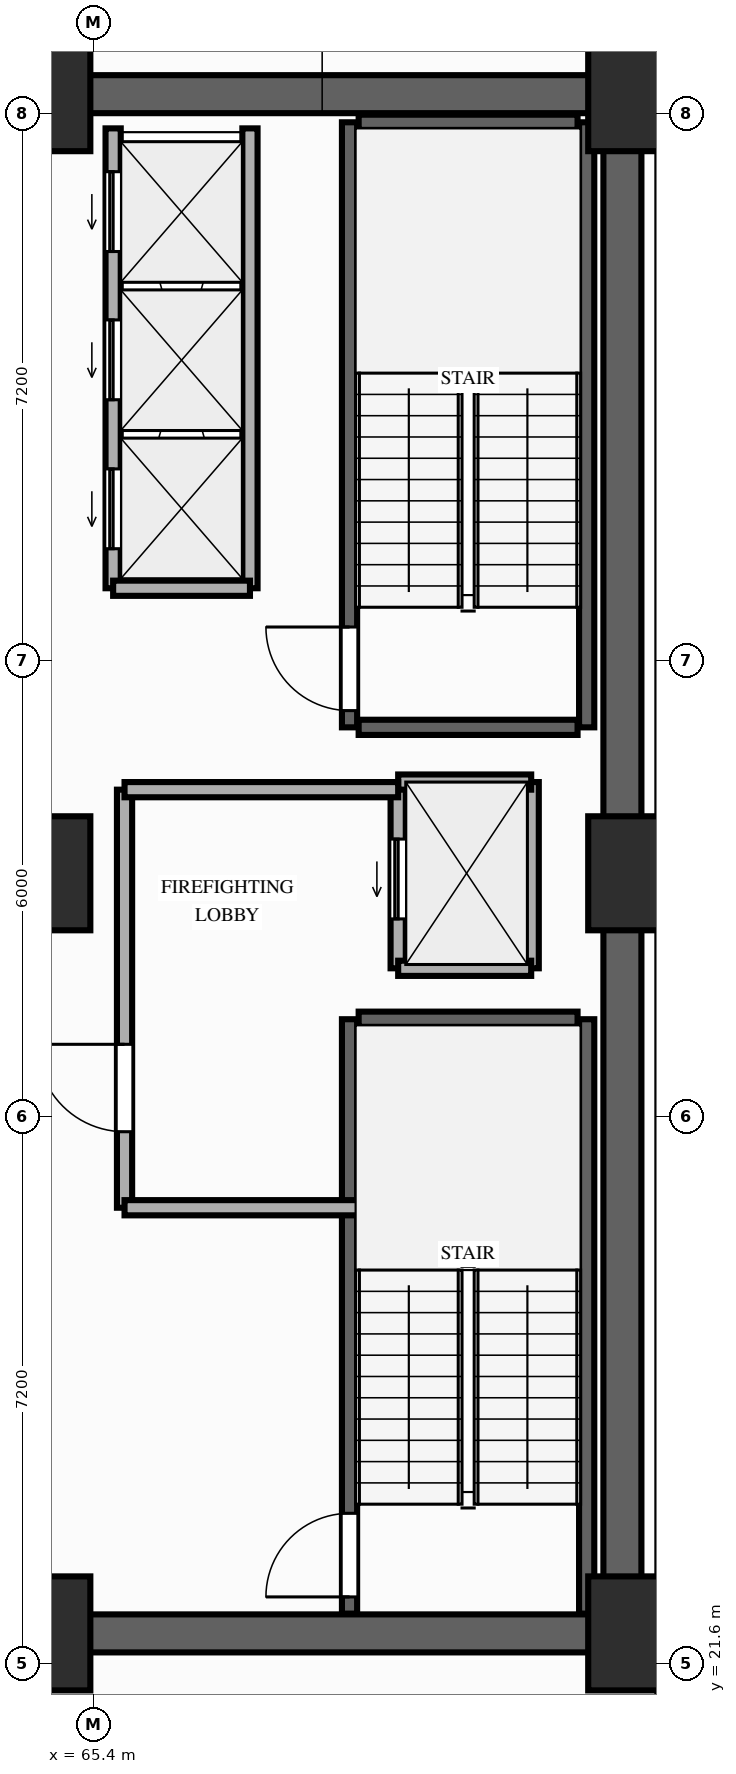
"""IFC4 building model, lengths in metres.
Left out: names, types, materials, properties, quantities, classifications, styles, units other than length and angle.
Written with IfcOpenShell. Run it as: python <this file> out.ifc"""

import sys

from ifc_helpers import new_model, si_unit, direction, frame, frame_2d, origin, origin_2d, place, context, subcontext, project, spatial, rectangle, extrude, element, fill, save


model = new_model("IFC4")
c1 = context("Model", 3, precision=1e-05, world=origin(), true_north=direction((0.0, 1.0)))
c2 = subcontext(c1, "Body", "Model", "MODEL_VIEW")
j1 = project(units=[si_unit("LENGTHUNIT", "METRE"), si_unit("PLANEANGLEUNIT", "RADIAN")], contexts=[c1])
p1 = place(None, origin())
s1 = spatial("IfcSite", under=j1, at=p1, CompositionType="ELEMENT")
p2 = place(p1, origin())
s2 = spatial("IfcBuilding", under=s1, at=p2, CompositionType="ELEMENT")
p3 = place(p2, frame((0.0, 0.0, 4.6)))
s3 = spatial("IfcBuildingStorey", under=s2, at=p3, CompositionType="ELEMENT", Elevation=4.6)
for number, where, z_axis, x_axis in (
    (1, (64.6, 22.0, 0.0), (0.0, 0.0, 1.0), (1.0, 0.0, 0.0)),
    (2, (72.65, 22.0, 0.0), (0.0, 0.0, 1.0), (1.0, 0.0, 0.0)),
    (3, (64.6, 32.0, 0.0), (0.0, 0.0, 1.0), (1.0, 0.0, 0.0)),
    (4, (72.65, 32.0, 0.0), (0.0, 0.0, 1.0), (1.0, 0.0, 0.0)),
    (5, (64.6, 42.25, 0.0), (0.0, 0.0, 1.0), (1.0, 0.0, 0.0)),
    (6, (72.65, 42.25, 0.0), (0.0, 0.0, 1.0), (1.0, 0.0, 0.0)),
):
    element("IfcColumn", number, at=place(p3, frame(where, z_axis=z_axis, x_axis=x_axis)), inside=s3, PredefinedType="COLUMN", context=c2, shape_type="SweptSolid", body=[
        extrude(rectangle(XDim=1.5, YDim=1.5, at=origin_2d()), origin(), (0.0, 0.0, 1.0), 4.2),
    ])
p4 = place(p3, frame((72.35, 22.0, 0.0), z_axis=(0.0, 0.0, 1.0), x_axis=(0.0, 1.0, 0.0)))
e7 = element("IfcWall", 7, at=p4, inside=s3, PredefinedType="SHEAR", context=c2, shape_type="SweptSolid", body=[
    extrude(rectangle(XDim=20.25, YDim=0.5, at=frame_2d((10.125, 0.0))), origin(), (0.0, 0.0, 1.0), 3.95),
])
for number, where, z_axis, x_axis in (
    (8, (64.6, 42.25, 0.0), (0.0, 0.0, 1.0), (1.0, 0.0, 0.0)),
    (9, (64.6, 22.0, 0.0), (0.0, 0.0, 1.0), (1.0, 0.0, 0.0)),
):
    element("IfcWall", number, at=place(p3, frame(where, z_axis=z_axis, x_axis=x_axis)), inside=s3, PredefinedType="SHEAR", context=c2, shape_type="SweptSolid", body=[
        extrude(rectangle(XDim=7.5, YDim=0.5, at=frame_2d((3.75, 0.0))), origin(), (0.0, 0.0, 1.0), 3.95),
    ])
p5 = place(p3, frame((68.76, 22.26, 0.0), z_axis=(0.0, 0.0, 1.0), x_axis=(0.0, 1.0, 0.0)))
e10 = element("IfcWall", 10, at=p5, inside=s3, PredefinedType="SHEAR", context=c2, shape_type="SweptSolid", body=[
    extrude(rectangle(XDim=7.82, YDim=0.2, at=frame_2d((3.91, 0.0))), origin(), (0.0, 0.0, 1.0), 3.95),
])
p6 = place(p5, frame((0.22, 0.0, 0.0)))
e11 = element("IfcOpeningElement", 11, at=p6, cuts=e10, PredefinedType="OPENING", context=c2, shape_type="SweptSolid", body=[
    extrude(rectangle(XDim=1.1, YDim=2.15, at=frame_2d((0.55, 1.075))), frame((0.0, 0.11, 0.0), z_axis=(0.0, -1.0, 0.0), x_axis=(1.0, 0.0, 0.0)), (0.0, 0.0, 1.0), 0.22),
])
p7 = place(p3, frame((71.88, 22.26, 0.0), z_axis=(0.0, 0.0, 1.0), x_axis=(0.0, 1.0, 0.0)))
e12 = element("IfcWall", 12, at=p7, inside=s3, PredefinedType="SHEAR", context=c2, shape_type="SweptSolid", body=[
    extrude(rectangle(XDim=7.82, YDim=0.2, at=frame_2d((3.91, 0.0))), origin(), (0.0, 0.0, 1.0), 3.95),
])
p8 = place(p3, frame((68.88, 30.08, 0.0), z_axis=(0.0, 0.0, 1.0), x_axis=(1.0, 0.0, 0.0)))
e13 = element("IfcWall", 13, at=p8, inside=s3, PredefinedType="SHEAR", context=c2, shape_type="SweptSolid", body=[
    extrude(rectangle(XDim=2.88, YDim=0.2, at=frame_2d((1.44, 0.0))), origin(), (0.0, 0.0, 1.0), 3.95),
])
p9 = place(p3, frame((68.76, 33.92, 0.0), z_axis=(0.0, 0.0, 1.0), x_axis=(0.0, 1.0, 0.0)))
e14 = element("IfcWall", 14, at=p9, inside=s3, PredefinedType="SHEAR", context=c2, shape_type="SweptSolid", body=[
    extrude(rectangle(XDim=7.96, YDim=0.2, at=frame_2d((3.98, 0.0))), origin(), (0.0, 0.0, 1.0), 3.95),
])
p10 = place(p9, frame((0.22, 0.0, 0.0)))
e15 = element("IfcOpeningElement", 15, at=p10, cuts=e14, PredefinedType="OPENING", context=c2, shape_type="SweptSolid", body=[
    extrude(rectangle(XDim=1.1, YDim=2.15, at=frame_2d((0.55, 1.075))), frame((0.0, 0.11, 0.0), z_axis=(0.0, -1.0, 0.0), x_axis=(1.0, 0.0, 0.0)), (0.0, 0.0, 1.0), 0.22),
])
p11 = place(p3, frame((71.88, 33.92, 0.0), z_axis=(0.0, 0.0, 1.0), x_axis=(0.0, 1.0, 0.0)))
e16 = element("IfcWall", 16, at=p11, inside=s3, PredefinedType="SHEAR", context=c2, shape_type="SweptSolid", body=[
    extrude(rectangle(XDim=7.96, YDim=0.2, at=frame_2d((3.98, 0.0))), origin(), (0.0, 0.0, 1.0), 3.95),
])
for number, where, z_axis, x_axis in (
    (17, (68.88, 41.88, 0.0), (0.0, 0.0, 1.0), (1.0, 0.0, 0.0)),
    (18, (68.88, 33.92, 0.0), (0.0, 0.0, 1.0), (1.0, 0.0, 0.0)),
):
    element("IfcWall", number, at=place(p3, frame(where, z_axis=z_axis, x_axis=x_axis)), inside=s3, PredefinedType="SHEAR", context=c2, shape_type="SweptSolid", body=[
        extrude(rectangle(XDim=2.88, YDim=0.2, at=frame_2d((1.44, 0.0))), origin(), (0.0, 0.0, 1.0), 3.95),
    ])
p12 = place(p3, frame((65.65, 35.75, 0.0), z_axis=(0.0, 0.0, 1.0), x_axis=(0.0, 1.0, 0.0)))
e19 = element("IfcWall", 19, at=p12, inside=s3, PredefinedType="MOVABLE", context=c2, shape_type="SweptSolid", body=[
    extrude(rectangle(XDim=6.05, YDim=0.2, at=frame_2d((3.025, 0.0))), origin(), (0.0, 0.0, 1.0), 3.95),
])
p13 = place(p12, frame((0.52, 0.0, 0.0)))
e20 = element("IfcOpeningElement", 20, at=p13, cuts=e19, PredefinedType="OPENING", context=c2, shape_type="SweptSolid", body=[
    extrude(rectangle(XDim=1.05, YDim=2.15, at=frame_2d((0.525, 1.075))), frame((0.0, 0.11, 0.0), z_axis=(0.0, -1.0, 0.0), x_axis=(1.0, 0.0, 0.0)), (0.0, 0.0, 1.0), 0.22),
])
p14 = place(p12, frame((2.48, 0.0, 0.0)))
e21 = element("IfcOpeningElement", 21, at=p14, cuts=e19, PredefinedType="OPENING", context=c2, shape_type="SweptSolid", body=[
    extrude(rectangle(XDim=1.05, YDim=2.15, at=frame_2d((0.525, 1.075))), frame((0.0, 0.11, 0.0), z_axis=(0.0, -1.0, 0.0), x_axis=(1.0, 0.0, 0.0)), (0.0, 0.0, 1.0), 0.22),
])
p15 = place(p12, frame((4.43, 0.0, 0.0)))
e22 = element("IfcOpeningElement", 22, at=p15, cuts=e19, PredefinedType="OPENING", context=c2, shape_type="SweptSolid", body=[
    extrude(rectangle(XDim=1.05, YDim=2.15, at=frame_2d((0.525, 1.075))), frame((0.0, 0.11, 0.0), z_axis=(0.0, -1.0, 0.0), x_axis=(1.0, 0.0, 0.0)), (0.0, 0.0, 1.0), 0.22),
])
p16 = place(p3, frame((67.45, 35.75, 0.0), z_axis=(0.0, 0.0, 1.0), x_axis=(0.0, 1.0, 0.0)))
e23 = element("IfcWall", 23, at=p16, inside=s3, PredefinedType="MOVABLE", context=c2, shape_type="SweptSolid", body=[
    extrude(rectangle(XDim=6.05, YDim=0.2, at=frame_2d((3.025, 0.0))), origin(), (0.0, 0.0, 1.0), 3.95),
])
p17 = place(p3, frame((65.65, 35.75, 0.0), z_axis=(0.0, 0.0, 1.0), x_axis=(1.0, 0.0, 0.0)))
e24 = element("IfcWall", 24, at=p17, inside=s3, PredefinedType="MOVABLE", context=c2, shape_type="SweptSolid", body=[
    extrude(rectangle(XDim=1.8, YDim=0.2, at=frame_2d((0.9, 0.0))), origin(), (0.0, 0.0, 1.0), 3.95),
])
p18 = place(p3, frame((69.4, 30.75, 0.0), z_axis=(0.0, 0.0, 1.0), x_axis=(0.0, 1.0, 0.0)))
e25 = element("IfcWall", 25, at=p18, inside=s3, PredefinedType="MOVABLE", context=c2, shape_type="SweptSolid", body=[
    extrude(rectangle(XDim=2.45, YDim=0.2, at=frame_2d((1.225, 0.0))), origin(), (0.0, 0.0, 1.0), 3.95),
])
p19 = place(p18, frame((0.65, 0.0, 0.0)))
e26 = element("IfcOpeningElement", 26, at=p19, cuts=e25, PredefinedType="OPENING", context=c2, shape_type="SweptSolid", body=[
    extrude(rectangle(XDim=1.05, YDim=2.15, at=frame_2d((0.525, 1.075))), frame((0.0, 0.11, 0.0), z_axis=(0.0, -1.0, 0.0), x_axis=(1.0, 0.0, 0.0)), (0.0, 0.0, 1.0), 0.22),
])
p20 = place(p3, frame((71.15, 30.75, 0.0), z_axis=(0.0, 0.0, 1.0), x_axis=(0.0, 1.0, 0.0)))
e27 = element("IfcWall", 27, at=p20, inside=s3, PredefinedType="MOVABLE", context=c2, shape_type="SweptSolid", body=[
    extrude(rectangle(XDim=2.45, YDim=0.2, at=frame_2d((1.225, 0.0))), origin(), (0.0, 0.0, 1.0), 3.95),
])
for number, where, z_axis, x_axis in (
    (28, (69.4, 33.2, 0.0), (0.0, 0.0, 1.0), (1.0, 0.0, 0.0)),
    (29, (69.4, 30.75, 0.0), (0.0, 0.0, 1.0), (1.0, 0.0, 0.0)),
):
    element("IfcWall", number, at=place(p3, frame(where, z_axis=z_axis, x_axis=x_axis)), inside=s3, PredefinedType="MOVABLE", context=c2, shape_type="SweptSolid", body=[
        extrude(rectangle(XDim=1.75, YDim=0.2, at=frame_2d((0.875, 0.0))), origin(), (0.0, 0.0, 1.0), 3.95),
    ])
p21 = place(p3, frame((65.8, 27.6, 0.0), z_axis=(0.0, 0.0, 1.0), x_axis=(0.0, 1.0, 0.0)))
e30 = element("IfcWall", 30, at=p21, inside=s3, PredefinedType="PARTITIONING", context=c2, shape_type="SweptSolid", body=[
    extrude(rectangle(XDim=5.5, YDim=0.2, at=frame_2d((2.75, 0.0))), origin(), (0.0, 0.0, 1.0), 3.95),
])
p22 = place(p21, frame((1.0, 0.0, 0.0)))
e31 = element("IfcOpeningElement", 31, at=p22, cuts=e30, PredefinedType="OPENING", context=c2, shape_type="SweptSolid", body=[
    extrude(rectangle(XDim=1.15, YDim=2.15, at=frame_2d((0.575, 1.075))), frame((0.0, 0.11, 0.0), z_axis=(0.0, -1.0, 0.0), x_axis=(1.0, 0.0, 0.0)), (0.0, 0.0, 1.0), 0.22),
])
p23 = place(p3, frame((65.8, 33.1, 0.0), z_axis=(0.0, 0.0, 1.0), x_axis=(1.0, 0.0, 0.0)))
e32 = element("IfcWall", 32, at=p23, inside=s3, PredefinedType="PARTITIONING", context=c2, shape_type="SweptSolid", body=[
    extrude(rectangle(XDim=3.6, YDim=0.2, at=frame_2d((1.8, 0.0))), origin(), (0.0, 0.0, 1.0), 3.95),
])
p24 = place(p3, frame((65.8, 27.6, 0.0), z_axis=(0.0, 0.0, 1.0), x_axis=(1.0, 0.0, 0.0)))
e33 = element("IfcWall", 33, at=p24, inside=s3, PredefinedType="PARTITIONING", context=c2, shape_type="SweptSolid", body=[
    extrude(rectangle(XDim=3.4, YDim=0.2, at=frame_2d((1.7, 0.0))), origin(), (0.0, 0.0, 1.0), 3.95),
])
p25 = place(p6, origin())
e34 = element("IfcDoor", 34, at=p25, inside=s3, OperationType="SINGLE_SWING_LEFT", PredefinedType="DOOR", context=c2, shape_type="SweptSolid", body=[
    extrude(rectangle(XDim=1.1, YDim=2.15, at=frame_2d((0.55, 1.075))), frame((0.0, 0.025, 0.0), z_axis=(0.0, -1.0, 0.0), x_axis=(1.0, 0.0, 0.0)), (0.0, 0.0, 1.0), 0.05),
])
fill(e11, e34)
p26 = place(p10, origin())
e35 = element("IfcDoor", 35, at=p26, inside=s3, OperationType="SINGLE_SWING_RIGHT", PredefinedType="DOOR", context=c2, shape_type="SweptSolid", body=[
    extrude(rectangle(XDim=1.1, YDim=2.15, at=frame_2d((0.55, 1.075))), frame((0.0, 0.025, 0.0), z_axis=(0.0, -1.0, 0.0), x_axis=(1.0, 0.0, 0.0)), (0.0, 0.0, 1.0), 0.05),
])
fill(e15, e35)
p27 = place(p13, origin())
e36 = element("IfcDoor", 36, at=p27, inside=s3, OperationType="SLIDING_TO_LEFT", PredefinedType="DOOR", context=c2, shape_type="SweptSolid", body=[
    extrude(rectangle(XDim=1.05, YDim=2.15, at=frame_2d((0.525, 1.075))), frame((0.0, 0.025, 0.0), z_axis=(0.0, -1.0, 0.0), x_axis=(1.0, 0.0, 0.0)), (0.0, 0.0, 1.0), 0.05),
])
fill(e20, e36)
p28 = place(p14, origin())
e37 = element("IfcDoor", 37, at=p28, inside=s3, OperationType="SLIDING_TO_LEFT", PredefinedType="DOOR", context=c2, shape_type="SweptSolid", body=[
    extrude(rectangle(XDim=1.05, YDim=2.15, at=frame_2d((0.525, 1.075))), frame((0.0, 0.025, 0.0), z_axis=(0.0, -1.0, 0.0), x_axis=(1.0, 0.0, 0.0)), (0.0, 0.0, 1.0), 0.05),
])
fill(e21, e37)
p29 = place(p15, origin())
e38 = element("IfcDoor", 38, at=p29, inside=s3, OperationType="SLIDING_TO_LEFT", PredefinedType="DOOR", context=c2, shape_type="SweptSolid", body=[
    extrude(rectangle(XDim=1.05, YDim=2.15, at=frame_2d((0.525, 1.075))), frame((0.0, 0.025, 0.0), z_axis=(0.0, -1.0, 0.0), x_axis=(1.0, 0.0, 0.0)), (0.0, 0.0, 1.0), 0.05),
])
fill(e22, e38)
p30 = place(p19, origin())
e39 = element("IfcDoor", 39, at=p30, inside=s3, OperationType="SLIDING_TO_LEFT", PredefinedType="DOOR", context=c2, shape_type="SweptSolid", body=[
    extrude(rectangle(XDim=1.05, YDim=2.15, at=frame_2d((0.525, 1.075))), frame((0.0, 0.025, 0.0), z_axis=(0.0, -1.0, 0.0), x_axis=(1.0, 0.0, 0.0)), (0.0, 0.0, 1.0), 0.05),
])
fill(e26, e39)
p31 = place(p22, origin())
e40 = element("IfcDoor", 40, at=p31, inside=s3, OperationType="SINGLE_SWING_RIGHT", PredefinedType="DOOR", context=c2, shape_type="SweptSolid", body=[
    extrude(rectangle(XDim=1.15, YDim=2.15, at=frame_2d((0.575, 1.075))), frame((0.0, 0.025, 0.0), z_axis=(0.0, -1.0, 0.0), x_axis=(1.0, 0.0, 0.0)), (0.0, 0.0, 1.0), 0.05),
])
fill(e31, e40)
save(model, sys.argv[1])
